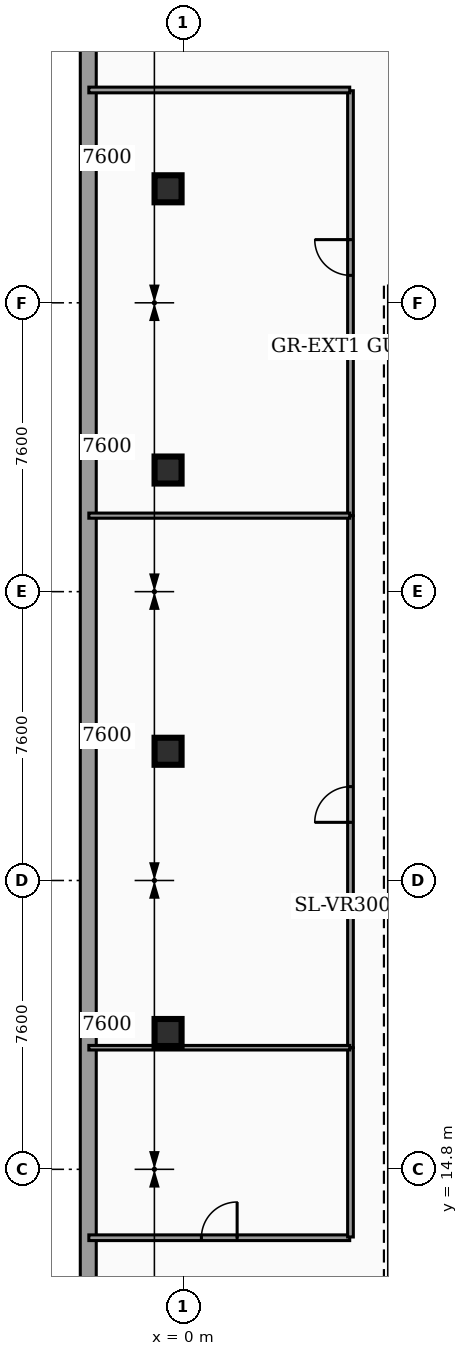
"""IFC4 building model, lengths in metres.
Left out: names, types, materials, properties, quantities, classifications, styles, units other than length and angle.
Written with IfcOpenShell. Run it as: python <this file> out.ifc"""

import sys

from ifc_helpers import new_model, si_unit, direction, frame, frame_2d, origin, origin_2d, place, context, subcontext, project, spatial, rectangle, hollow_circle, extrude, element, fill, save


model = new_model("IFC4")
c1 = context("Model", 3, precision=1e-05, world=origin(), true_north=direction((0.0, 1.0)))
c2 = subcontext(c1, "Body", "Model", "MODEL_VIEW")
j1 = project(units=[si_unit("LENGTHUNIT", "METRE"), si_unit("PLANEANGLEUNIT", "RADIAN")], contexts=[c1])
p1 = place(None, origin())
s1 = spatial("IfcSite", under=j1, at=p1, CompositionType="ELEMENT")
p2 = place(p1, origin())
s2 = spatial("IfcBuilding", under=s1, at=p2, CompositionType="ELEMENT")
p3 = place(p2, frame((0.0, 0.0, -4.08)))
s3 = spatial("IfcBuildingStorey", under=s2, at=p3, CompositionType="ELEMENT", Elevation=-4.08)
p4 = place(p3, frame((-2.5, 9.0, 0.0), z_axis=(0.0, 0.0, 1.0), x_axis=(0.0, 1.0, 0.0)))
e1 = element("IfcWall", 1, at=p4, inside=s3, PredefinedType="SOLIDWALL", context=c2, shape_type="SweptSolid", body=[
    extrude(rectangle(XDim=39.0, YDim=0.42, at=frame_2d((19.5, 0.0))), origin(), (0.0, 0.0, 1.0), 3.76),
])
for number, where, z_axis, x_axis in (
    (2, (-0.4, 40.6, 0.0), (0.0, 0.0, 1.0), (1.0, 0.0, 0.0)),
    (3, (-0.4, 18.4, 0.0), (0.0, 0.0, 1.0), (1.0, 0.0, 0.0)),
    (4, (-0.4, 25.8, 0.0), (0.0, 0.0, 1.0), (1.0, 0.0, 0.0)),
    (5, (-0.4, 33.2, 0.0), (0.0, 0.0, 1.0), (1.0, 0.0, 0.0)),
):
    element("IfcColumn", number, at=place(p3, frame(where, z_axis=z_axis, x_axis=x_axis)), inside=s3, PredefinedType="COLUMN", context=c2, shape_type="SweptSolid", body=[
        extrude(hollow_circle(Radius=0.355, WallThickness=0.03, at=origin_2d()), origin(), (0.0, 0.0, 1.0), 3.76),
    ])
p5 = place(p3, frame((-2.485, 13.0, 0.0), z_axis=(0.0, 0.0, 1.0), x_axis=(1.0, 0.0, 0.0)))
e6 = element("IfcWall", 6, at=p5, inside=s3, PredefinedType="PARTITIONING", context=c2, shape_type="SweptSolid", body=[
    extrude(rectangle(XDim=6.865, YDim=0.15, at=frame_2d((3.433, 0.0))), origin(), (0.0, 0.0, 1.0), 2.717),
])
p6 = place(p5, frame((2.962, 0.0, 0.0)))
e7 = element("IfcOpeningElement", 7, at=p6, cuts=e6, PredefinedType="OPENING", context=c2, shape_type="SweptSolid", body=[
    extrude(rectangle(XDim=0.94, YDim=2.05, at=frame_2d((0.47, 1.025))), frame((0.0, 0.085, 0.0), z_axis=(0.0, -1.0, 0.0), x_axis=(1.0, 0.0, 0.0)), (0.0, 0.0, 1.0), 0.17),
])
p7 = place(p3, frame((4.4, 13.02, 0.0), z_axis=(0.0, 0.0, 1.0), x_axis=(0.0, 1.0, 0.0)))
e8 = element("IfcWall", 8, at=p7, inside=s3, PredefinedType="PARTITIONING", context=c2, shape_type="SweptSolid", body=[
    extrude(rectangle(XDim=4.975, YDim=0.15, at=frame_2d((2.488, 0.0))), origin(), (0.0, 0.0, 1.0), 2.717),
])
p8 = place(p3, frame((4.4, 18.005, 0.0), z_axis=(0.0, 0.0, 1.0), x_axis=(0.0, 1.0, 0.0)))
e9 = element("IfcWall", 9, at=p8, inside=s3, PredefinedType="PARTITIONING", context=c2, shape_type="SweptSolid", body=[
    extrude(rectangle(XDim=13.99, YDim=0.15, at=frame_2d((6.995, 0.0))), origin(), (0.0, 0.0, 1.0), 2.717),
])
p9 = place(p8, frame((5.925, 0.0, 0.0)))
e10 = element("IfcOpeningElement", 10, at=p9, cuts=e9, PredefinedType="OPENING", context=c2, shape_type="SweptSolid", body=[
    extrude(rectangle(XDim=0.94, YDim=2.05, at=frame_2d((0.47, 1.025))), frame((0.0, 0.085, 0.0), z_axis=(0.0, -1.0, 0.0), x_axis=(1.0, 0.0, 0.0)), (0.0, 0.0, 1.0), 0.17),
])
p10 = place(p3, frame((4.4, 32.005, 0.0), z_axis=(0.0, 0.0, 1.0), x_axis=(0.0, 1.0, 0.0)))
e11 = element("IfcWall", 11, at=p10, inside=s3, PredefinedType="PARTITIONING", context=c2, shape_type="SweptSolid", body=[
    extrude(rectangle(XDim=11.175, YDim=0.15, at=frame_2d((5.587, 0.0))), origin(), (0.0, 0.0, 1.0), 2.717),
])
p11 = place(p10, frame((6.317, 0.0, 0.0)))
e12 = element("IfcOpeningElement", 12, at=p11, cuts=e11, PredefinedType="OPENING", context=c2, shape_type="SweptSolid", body=[
    extrude(rectangle(XDim=0.94, YDim=2.05, at=frame_2d((0.47, 1.025))), frame((0.0, 0.085, 0.0), z_axis=(0.0, -1.0, 0.0), x_axis=(1.0, 0.0, 0.0)), (0.0, 0.0, 1.0), 0.17),
])
p12 = place(p3, frame((-2.485, 43.2, 0.0), z_axis=(0.0, 0.0, 1.0), x_axis=(1.0, 0.0, 0.0)))
e13 = element("IfcWall", 13, at=p12, inside=s3, PredefinedType="PARTITIONING", context=c2, shape_type="SweptSolid", body=[
    extrude(rectangle(XDim=6.865, YDim=0.15, at=frame_2d((3.433, 0.0))), origin(), (0.0, 0.0, 1.0), 2.717),
])
p13 = place(p3, frame((-2.485, 18.0, 0.0), z_axis=(0.0, 0.0, 1.0), x_axis=(1.0, 0.0, 0.0)))
e14 = element("IfcWall", 14, at=p13, inside=s3, PredefinedType="PARTITIONING", context=c2, shape_type="SweptSolid", body=[
    extrude(rectangle(XDim=6.865, YDim=0.12, at=frame_2d((3.433, 0.0))), origin(), (0.0, 0.0, 1.0), 2.717),
])
p14 = place(p3, frame((-2.485, 32.0, 0.0), z_axis=(0.0, 0.0, 1.0), x_axis=(1.0, 0.0, 0.0)))
e15 = element("IfcWall", 15, at=p14, inside=s3, PredefinedType="PARTITIONING", context=c2, shape_type="SweptSolid", body=[
    extrude(rectangle(XDim=6.865, YDim=0.135, at=frame_2d((3.433, 0.0))), origin(), (0.0, 0.0, 1.0), 2.717),
])
p15 = place(p6, origin())
e16 = element("IfcDoor", 16, at=p15, inside=s3, OperationType="SINGLE_SWING_RIGHT", PredefinedType="DOOR", context=c2, shape_type="SweptSolid", body=[
    extrude(rectangle(XDim=0.94, YDim=2.05, at=frame_2d((0.47, 1.025))), frame((0.0, 0.025, 0.0), z_axis=(0.0, -1.0, 0.0), x_axis=(1.0, 0.0, 0.0)), (0.0, 0.0, 1.0), 0.05),
])
fill(e7, e16)
p16 = place(p9, origin())
e17 = element("IfcDoor", 17, at=p16, inside=s3, OperationType="SINGLE_SWING_LEFT", PredefinedType="DOOR", context=c2, shape_type="SweptSolid", body=[
    extrude(rectangle(XDim=0.94, YDim=2.05, at=frame_2d((0.47, 1.025))), frame((0.0, 0.025, 0.0), z_axis=(0.0, -1.0, 0.0), x_axis=(1.0, 0.0, 0.0)), (0.0, 0.0, 1.0), 0.05),
])
fill(e10, e17)
p17 = place(p11, origin())
e18 = element("IfcDoor", 18, at=p17, inside=s3, OperationType="SINGLE_SWING_RIGHT", PredefinedType="DOOR", context=c2, shape_type="SweptSolid", body=[
    extrude(rectangle(XDim=0.94, YDim=2.05, at=frame_2d((0.47, 1.025))), frame((0.0, 0.025, 0.0), z_axis=(0.0, -1.0, 0.0), x_axis=(1.0, 0.0, 0.0)), (0.0, 0.0, 1.0), 0.05),
])
fill(e12, e18)
save(model, sys.argv[1])
